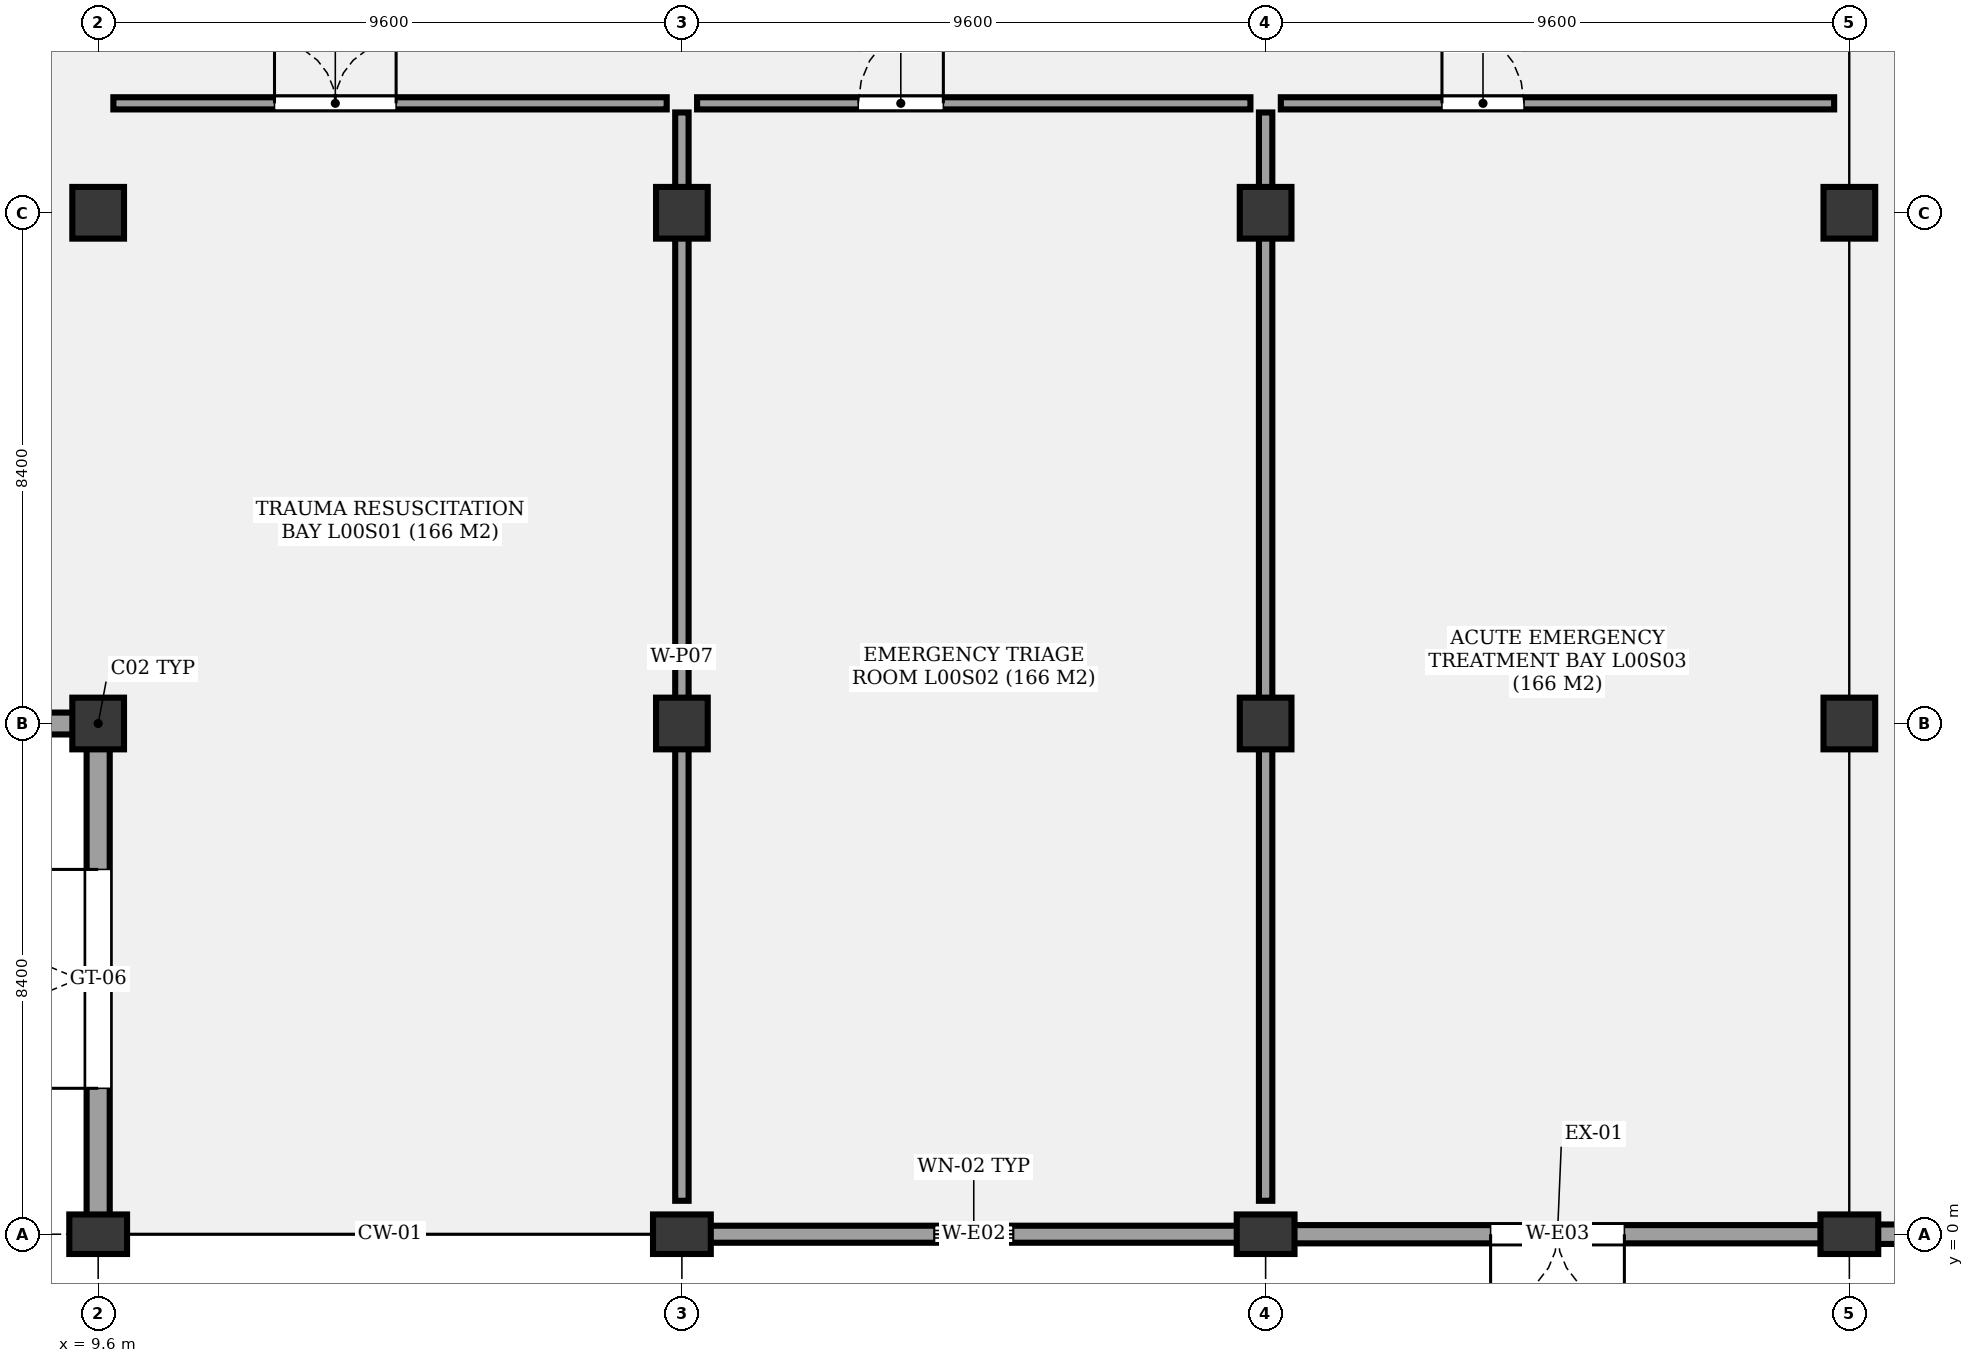
"""IFC4 building model, lengths in metres.
Left out: names, types, materials, properties, quantities, classifications, styles, units other than length and angle.
Written with IfcOpenShell. Run it as: python <this file> out.ifc"""

import sys

from ifc_helpers import new_model, si_unit, direction, frame, frame_2d, origin, origin_2d, place, context, subcontext, project, spatial, rectangle, extrude, element, fill, save


model = new_model("IFC4")
c1 = context("Model", 3, precision=1e-05, world=origin(), true_north=direction((0.0, 1.0)))
c2 = subcontext(c1, "Body", "Model", "MODEL_VIEW")
j1 = project(units=[si_unit("LENGTHUNIT", "METRE"), si_unit("PLANEANGLEUNIT", "RADIAN")], contexts=[c1])
p1 = place(None, origin())
s1 = spatial("IfcSite", under=j1, at=p1, CompositionType="ELEMENT")
p2 = place(p1, origin())
s2 = spatial("IfcBuilding", under=s1, at=p2, CompositionType="ELEMENT")
p3 = place(p2, origin())
s3 = spatial("IfcBuildingStorey", under=s2, at=p3, CompositionType="ELEMENT", Elevation=0.0)
p4 = place(p3, frame((9.6, 0.0, -0.35), z_axis=(0.0, 0.0, 1.0), x_axis=(0.0, 1.0, 0.0)))
e1 = element("IfcColumn", 1, at=p4, inside=s3, PredefinedType="COLUMN", context=c2, shape_type="SweptSolid", body=[
    extrude(rectangle(XDim=0.95, YDim=0.65, at=origin_2d()), origin(), (0.0, 0.0, 1.0), 5.45),
])
for number, where, z_axis, x_axis in (
    (2, (9.6, 8.4, -0.35), (0.0, 0.0, 1.0), (1.0, 0.0, 0.0)),
    (3, (9.6, 16.8, -0.35), (0.0, 0.0, 1.0), (1.0, 0.0, 0.0)),
):
    element("IfcColumn", number, at=place(p3, frame(where, z_axis=z_axis, x_axis=x_axis)), inside=s3, PredefinedType="COLUMN", context=c2, shape_type="SweptSolid", body=[
        extrude(rectangle(XDim=0.85, YDim=0.85, at=origin_2d()), origin(), (0.0, 0.0, 1.0), 5.45),
    ])
p5 = place(p3, frame((19.2, 0.0, -0.35), z_axis=(0.0, 0.0, 1.0), x_axis=(0.0, 1.0, 0.0)))
e4 = element("IfcColumn", 4, at=p5, inside=s3, PredefinedType="COLUMN", context=c2, shape_type="SweptSolid", body=[
    extrude(rectangle(XDim=0.95, YDim=0.65, at=origin_2d()), origin(), (0.0, 0.0, 1.0), 5.45),
])
for number, where, z_axis, x_axis in (
    (5, (19.2, 8.4, -0.35), (0.0, 0.0, 1.0), (1.0, 0.0, 0.0)),
    (6, (19.2, 16.8, -0.35), (0.0, 0.0, 1.0), (1.0, 0.0, 0.0)),
):
    element("IfcColumn", number, at=place(p3, frame(where, z_axis=z_axis, x_axis=x_axis)), inside=s3, PredefinedType="COLUMN", context=c2, shape_type="SweptSolid", body=[
        extrude(rectangle(XDim=0.85, YDim=0.85, at=origin_2d()), origin(), (0.0, 0.0, 1.0), 5.45),
    ])
p6 = place(p3, frame((28.8, 0.0, -0.35), z_axis=(0.0, 0.0, 1.0), x_axis=(0.0, 1.0, 0.0)))
e7 = element("IfcColumn", 7, at=p6, inside=s3, PredefinedType="COLUMN", context=c2, shape_type="SweptSolid", body=[
    extrude(rectangle(XDim=0.95, YDim=0.65, at=origin_2d()), origin(), (0.0, 0.0, 1.0), 5.45),
])
for number, where, z_axis, x_axis in (
    (8, (28.8, 8.4, -0.35), (0.0, 0.0, 1.0), (1.0, 0.0, 0.0)),
    (9, (28.8, 16.8, -0.35), (0.0, 0.0, 1.0), (1.0, 0.0, 0.0)),
):
    element("IfcColumn", number, at=place(p3, frame(where, z_axis=z_axis, x_axis=x_axis)), inside=s3, PredefinedType="COLUMN", context=c2, shape_type="SweptSolid", body=[
        extrude(rectangle(XDim=0.85, YDim=0.85, at=origin_2d()), origin(), (0.0, 0.0, 1.0), 5.45),
    ])
p7 = place(p3, frame((38.4, 0.0, -0.35), z_axis=(0.0, 0.0, 1.0), x_axis=(0.0, 1.0, 0.0)))
e10 = element("IfcColumn", 10, at=p7, inside=s3, PredefinedType="COLUMN", context=c2, shape_type="SweptSolid", body=[
    extrude(rectangle(XDim=0.95, YDim=0.65, at=origin_2d()), origin(), (0.0, 0.0, 1.0), 5.45),
])
for number, where, z_axis, x_axis in (
    (11, (38.4, 8.4, -0.35), (0.0, 0.0, 1.0), (1.0, 0.0, 0.0)),
    (12, (38.4, 16.8, -0.35), (0.0, 0.0, 1.0), (1.0, 0.0, 0.0)),
):
    element("IfcColumn", number, at=place(p3, frame(where, z_axis=z_axis, x_axis=x_axis)), inside=s3, PredefinedType="COLUMN", context=c2, shape_type="SweptSolid", body=[
        extrude(rectangle(XDim=0.85, YDim=0.85, at=origin_2d()), origin(), (0.0, 0.0, 1.0), 5.45),
    ])
p8 = place(p3, frame((28.8, 0.0, 0.0), z_axis=(0.0, 0.0, 1.0), x_axis=(-1.0, 0.0, 0.0)))
e13 = element("IfcWall", 13, at=p8, inside=s3, PredefinedType="SOLIDWALL", context=c2, shape_type="SweptSolid", body=[
    extrude(rectangle(XDim=9.6, YDim=0.28, at=frame_2d((4.8, 0.0))), origin(), (0.0, 0.0, 1.0), 4.24),
])
p9 = place(p8, frame((4.15, 0.0, 0.85)))
e14 = element("IfcOpeningElement", 14, at=p9, cuts=e13, PredefinedType="OPENING", context=c2, shape_type="SweptSolid", body=[
    extrude(rectangle(XDim=1.3, YDim=1.2, at=frame_2d((0.65, 0.6))), frame((0.0, 0.15, 0.0), z_axis=(0.0, -1.0, 0.0), x_axis=(1.0, 0.0, 0.0)), (0.0, 0.0, 1.0), 0.3),
])
p10 = place(p3, frame((38.4, 0.0, 0.0), z_axis=(0.0, 0.0, 1.0), x_axis=(-1.0, 0.0, 0.0)))
e15 = element("IfcWall", 15, at=p10, inside=s3, PredefinedType="SOLIDWALL", context=c2, shape_type="SweptSolid", body=[
    extrude(rectangle(XDim=9.6, YDim=0.3, at=frame_2d((4.8, 0.0))), origin(), (0.0, 0.0, 1.0), 4.24),
])
p11 = place(p10, frame((3.7, 0.0, 0.0)))
e16 = element("IfcOpeningElement", 16, at=p11, cuts=e15, PredefinedType="OPENING", context=c2, shape_type="SweptSolid", body=[
    extrude(rectangle(XDim=2.2, YDim=2.5, at=frame_2d((1.1, 1.25))), frame((0.0, 0.16, 0.0), z_axis=(0.0, -1.0, 0.0), x_axis=(1.0, 0.0, 0.0)), (0.0, 0.0, 1.0), 0.32),
])
p12 = place(p3, frame((48.0, 0.0, 0.0), z_axis=(0.0, 0.0, 1.0), x_axis=(-1.0, 0.0, 0.0)))
e17 = element("IfcWall", 17, at=p12, inside=s3, PredefinedType="SOLIDWALL", context=c2, shape_type="SweptSolid", body=[
    extrude(rectangle(XDim=9.6, YDim=0.32, at=frame_2d((4.8, 0.0))), origin(), (0.0, 0.0, 1.0), 4.24),
])
p13 = place(p12, frame((3.7, 0.0, 0.0)))
e18 = element("IfcOpeningElement", 18, at=p13, cuts=e17, PredefinedType="OPENING", context=c2, shape_type="SweptSolid", body=[
    extrude(rectangle(XDim=2.2, YDim=2.5, at=frame_2d((1.1, 1.25))), frame((0.0, 0.17, 0.0), z_axis=(0.0, -1.0, 0.0), x_axis=(1.0, 0.0, 0.0)), (0.0, 0.0, 1.0), 0.34),
])
p14 = place(p3, frame((9.6, 8.4, 0.0), z_axis=(0.0, 0.0, 1.0), x_axis=(-1.0, 0.0, 0.0)))
e19 = element("IfcWall", 19, at=p14, inside=s3, PredefinedType="SOLIDWALL", context=c2, shape_type="SweptSolid", body=[
    extrude(rectangle(XDim=9.6, YDim=0.36, at=frame_2d((4.8, 0.0))), origin(), (0.0, 0.0, 1.0), 4.24),
])
p15 = place(p14, frame((3.0, 0.0, 0.0)))
e20 = element("IfcOpeningElement", 20, at=p15, cuts=e19, PredefinedType="OPENING", context=c2, shape_type="SweptSolid", body=[
    extrude(rectangle(XDim=3.6, YDim=2.8, at=frame_2d((1.8, 1.4))), frame((0.0, 0.19, 0.0), z_axis=(0.0, -1.0, 0.0), x_axis=(1.0, 0.0, 0.0)), (0.0, 0.0, 1.0), 0.38),
])
p16 = place(p3, frame((9.6, 0.16, 0.0), z_axis=(0.0, 0.0, 1.0), x_axis=(0.0, 1.0, 0.0)))
e21 = element("IfcWall", 21, at=p16, inside=s3, PredefinedType="SOLIDWALL", context=c2, shape_type="SweptSolid", body=[
    extrude(rectangle(XDim=8.08, YDim=0.38, at=frame_2d((4.04, 0.0))), origin(), (0.0, 0.0, 1.0), 4.24),
])
p17 = place(p16, frame((2.24, 0.0, 0.0)))
e22 = element("IfcOpeningElement", 22, at=p17, cuts=e21, PredefinedType="OPENING", context=c2, shape_type="SweptSolid", body=[
    extrude(rectangle(XDim=3.6, YDim=2.8, at=frame_2d((1.8, 1.4))), frame((0.0, 0.2, 0.0), z_axis=(0.0, -1.0, 0.0), x_axis=(1.0, 0.0, 0.0)), (0.0, 0.0, 1.0), 0.4),
])
p18 = place(p3, frame((9.85, 18.6, 0.0), z_axis=(0.0, 0.0, 1.0), x_axis=(1.0, 0.0, 0.0)))
e23 = element("IfcWall", 23, at=p18, inside=s3, PredefinedType="PARTITIONING", context=c2, shape_type="SweptSolid", body=[
    extrude(rectangle(XDim=9.1, YDim=0.2, at=frame_2d((4.55, 0.0))), origin(), (0.0, 0.0, 1.0), 3.98),
])
p19 = place(p18, frame((2.65, 0.0, 0.0)))
e24 = element("IfcOpeningElement", 24, at=p19, cuts=e23, PredefinedType="OPENING", context=c2, shape_type="SweptSolid", body=[
    extrude(rectangle(XDim=2.0, YDim=2.4, at=frame_2d((1.0, 1.2))), frame((0.0, 0.11, 0.0), z_axis=(0.0, -1.0, 0.0), x_axis=(1.0, 0.0, 0.0)), (0.0, 0.0, 1.0), 0.22),
])
p20 = place(p3, frame((19.45, 18.6, 0.0), z_axis=(0.0, 0.0, 1.0), x_axis=(1.0, 0.0, 0.0)))
e25 = element("IfcWall", 25, at=p20, inside=s3, PredefinedType="PARTITIONING", context=c2, shape_type="SweptSolid", body=[
    extrude(rectangle(XDim=9.1, YDim=0.2, at=frame_2d((4.55, 0.0))), origin(), (0.0, 0.0, 1.0), 3.98),
])
p21 = place(p20, frame((2.65, 0.0, 0.0)))
e26 = element("IfcOpeningElement", 26, at=p21, cuts=e25, PredefinedType="OPENING", context=c2, shape_type="SweptSolid", body=[
    extrude(rectangle(XDim=1.4, YDim=2.4, at=frame_2d((0.7, 1.2))), frame((0.0, 0.11, 0.0), z_axis=(0.0, -1.0, 0.0), x_axis=(1.0, 0.0, 0.0)), (0.0, 0.0, 1.0), 0.22),
])
p22 = place(p3, frame((19.2, 0.55, 0.0), z_axis=(0.0, 0.0, 1.0), x_axis=(0.0, 1.0, 0.0)))
e27 = element("IfcWall", 27, at=p22, inside=s3, PredefinedType="PARTITIONING", context=c2, shape_type="SweptSolid", body=[
    extrude(rectangle(XDim=17.9, YDim=0.22, at=frame_2d((8.95, 0.0))), origin(), (0.0, 0.0, 1.0), 3.98),
])
p23 = place(p3, frame((29.05, 18.6, 0.0), z_axis=(0.0, 0.0, 1.0), x_axis=(1.0, 0.0, 0.0)))
e28 = element("IfcWall", 28, at=p23, inside=s3, PredefinedType="PARTITIONING", context=c2, shape_type="SweptSolid", body=[
    extrude(rectangle(XDim=9.1, YDim=0.2, at=frame_2d((4.55, 0.0))), origin(), (0.0, 0.0, 1.0), 3.98),
])
p24 = place(p23, frame((2.65, 0.0, 0.0)))
e29 = element("IfcOpeningElement", 29, at=p24, cuts=e28, PredefinedType="OPENING", context=c2, shape_type="SweptSolid", body=[
    extrude(rectangle(XDim=1.35, YDim=2.4, at=frame_2d((0.675, 1.2))), frame((0.0, 0.11, 0.0), z_axis=(0.0, -1.0, 0.0), x_axis=(1.0, 0.0, 0.0)), (0.0, 0.0, 1.0), 0.22),
])
p25 = place(p3, frame((28.8, 0.55, 0.0), z_axis=(0.0, 0.0, 1.0), x_axis=(0.0, 1.0, 0.0)))
e30 = element("IfcWall", 30, at=p25, inside=s3, PredefinedType="PARTITIONING", context=c2, shape_type="SweptSolid", body=[
    extrude(rectangle(XDim=17.9, YDim=0.22, at=frame_2d((8.95, 0.0))), origin(), (0.0, 0.0, 1.0), 3.98),
])
p26 = place(p9, origin())
e31 = element("IfcWindow", 31, at=p26, inside=s3, PartitioningType="SINGLE_PANEL", PredefinedType="WINDOW", context=c2, shape_type="SweptSolid", body=[
    extrude(rectangle(XDim=1.3, YDim=1.2, at=frame_2d((0.65, 0.6))), frame((0.0, 0.03, 0.0), z_axis=(0.0, -1.0, 0.0), x_axis=(1.0, 0.0, 0.0)), (0.0, 0.0, 1.0), 0.06),
])
fill(e14, e31)
p27 = place(p11, origin())
e32 = element("IfcDoor", 32, at=p27, inside=s3, OperationType="DOUBLE_DOOR_SINGLE_SWING", PredefinedType="DOOR", context=c2, shape_type="SweptSolid", body=[
    extrude(rectangle(XDim=2.2, YDim=2.5, at=frame_2d((1.1, 1.25))), frame((0.0, 0.025, 0.0), z_axis=(0.0, -1.0, 0.0), x_axis=(1.0, 0.0, 0.0)), (0.0, 0.0, 1.0), 0.05),
])
fill(e16, e32)
p28 = place(p17, origin())
e33 = element("IfcDoor", 33, at=p28, inside=s3, OperationType="DOUBLE_DOOR_SINGLE_SWING", PredefinedType="GATE", context=c2, shape_type="SweptSolid", body=[
    extrude(rectangle(XDim=3.6, YDim=2.8, at=frame_2d((1.8, 1.4))), frame((0.0, 0.025, 0.0), z_axis=(0.0, -1.0, 0.0), x_axis=(1.0, 0.0, 0.0)), (0.0, 0.0, 1.0), 0.05),
])
fill(e22, e33)
p29 = place(p19, origin())
e34 = element("IfcDoor", 34, at=p29, inside=s3, OperationType="DOUBLE_DOOR_SINGLE_SWING", PredefinedType="DOOR", context=c2, shape_type="SweptSolid", body=[
    extrude(rectangle(XDim=2.0, YDim=2.4, at=frame_2d((1.0, 1.2))), frame((0.0, 0.025, 0.0), z_axis=(0.0, -1.0, 0.0), x_axis=(1.0, 0.0, 0.0)), (0.0, 0.0, 1.0), 0.05),
])
fill(e24, e34)
p30 = place(p21, origin())
e35 = element("IfcDoor", 35, at=p30, inside=s3, OperationType="SINGLE_SWING_RIGHT", PredefinedType="DOOR", context=c2, shape_type="SweptSolid", body=[
    extrude(rectangle(XDim=1.4, YDim=2.4, at=frame_2d((0.7, 1.2))), frame((0.0, 0.025, 0.0), z_axis=(0.0, -1.0, 0.0), x_axis=(1.0, 0.0, 0.0)), (0.0, 0.0, 1.0), 0.05),
])
fill(e26, e35)
p31 = place(p24, origin())
e36 = element("IfcDoor", 36, at=p31, inside=s3, OperationType="SINGLE_SWING_LEFT", PredefinedType="DOOR", context=c2, shape_type="SweptSolid", body=[
    extrude(rectangle(XDim=1.35, YDim=2.4, at=frame_2d((0.675, 1.2))), frame((0.0, 0.025, 0.0), z_axis=(0.0, -1.0, 0.0), x_axis=(1.0, 0.0, 0.0)), (0.0, 0.0, 1.0), 0.05),
])
fill(e29, e36)
save(model, sys.argv[1])
